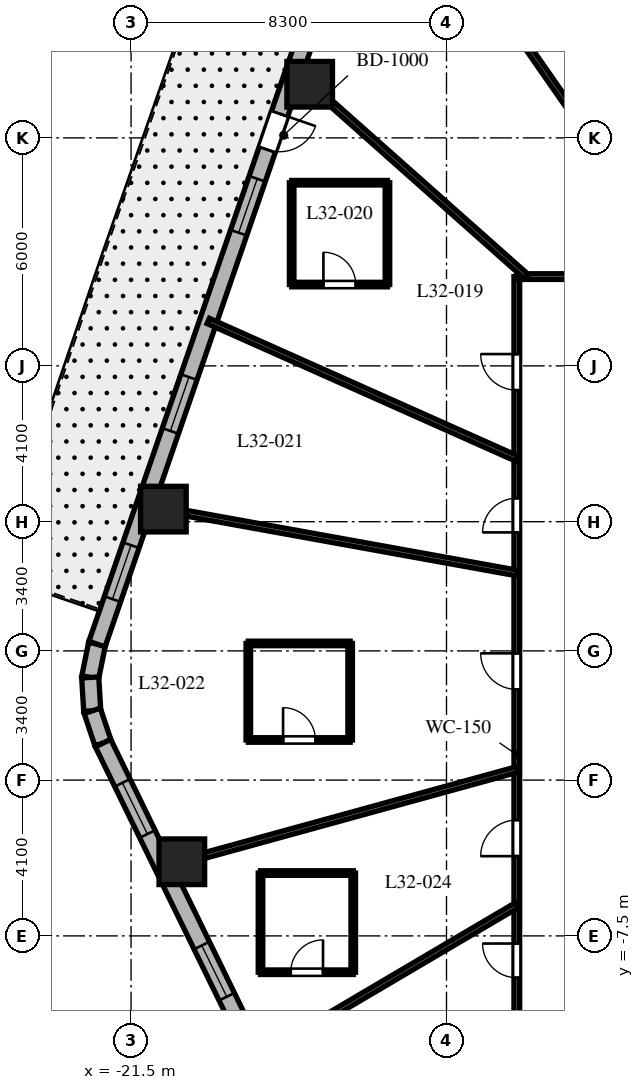
"""IFC4 building model, lengths in metres.
Left out: names, types, materials, properties, quantities, classifications, styles, units other than length and angle.
Written with IfcOpenShell. Run it as: python <this file> out.ifc"""

import sys

from ifc_helpers import new_model, si_unit, direction, frame, frame_2d, origin, origin_2d, place, context, subcontext, project, spatial, rectangle, extrude, element, fill, save


model = new_model("IFC4")
c1 = context("Model", 3, precision=1e-05, world=origin(), true_north=direction((0.0, 1.0)))
c2 = subcontext(c1, "Body", "Model", "MODEL_VIEW")
j1 = project(units=[si_unit("LENGTHUNIT", "METRE"), si_unit("PLANEANGLEUNIT", "RADIAN")], contexts=[c1])
p1 = place(None, origin())
s1 = spatial("IfcSite", under=j1, at=p1, CompositionType="ELEMENT")
p2 = place(p1, origin())
s2 = spatial("IfcBuilding", under=s1, at=p2, CompositionType="ELEMENT")
p3 = place(p2, frame((0.0, 0.0, 132.1)))
s3 = spatial("IfcBuildingStorey", under=s2, at=p3, CompositionType="ELEMENT", Elevation=132.1)
for number, where, z_axis, x_axis in (
    (1, (-16.8, 14.911, 0.0), (0.0, 0.0, 1.0), (1.0, 0.0, 0.0)),
    (2, (-20.65, 3.731, 0.0), (0.0, 0.0, 1.0), (1.0, 0.0, 0.0)),
    (3, (-20.164, -5.549, 0.0), (0.0, 0.0, 1.0), (1.0, 0.0, 0.0)),
):
    element("IfcColumn", number, at=place(p3, frame(where, z_axis=z_axis, x_axis=x_axis)), inside=s3, PredefinedType="COLUMN", context=c2, shape_type="SweptSolid", body=[
        extrude(rectangle(XDim=1.2, YDim=1.2, at=origin_2d()), origin(), (0.0, 0.0, 1.0), 3.7),
    ])
p4 = place(p3, frame((-22.397, 0.179, 0.0), z_axis=(0.0, 0.0, 1.0), x_axis=(-0.199313589404, -0.979935759669, 0.0)))
e4 = element("IfcWall", 4, at=p4, inside=s3, PredefinedType="SOLIDWALL", context=c2, shape_type="SweptSolid", body=[
    extrude(rectangle(XDim=0.896, YDim=0.45, at=frame_2d((0.448, 0.0))), origin(), (0.0, 0.0, 1.0), 3.4),
])
p5 = place(p3, frame((-22.575, -0.698, 0.0), z_axis=(0.0, 0.0, 1.0), x_axis=(0.060980441946, -0.998138961117, 0.0)))
e5 = element("IfcWall", 5, at=p5, inside=s3, PredefinedType="SOLIDWALL", context=c2, shape_type="SweptSolid", body=[
    extrude(rectangle(XDim=0.881, YDim=0.45, at=frame_2d((0.44, 0.0))), origin(), (0.0, 0.0, 1.0), 3.4),
])
p6 = place(p3, frame((-22.522, -1.577, 0.0), z_axis=(0.0, 0.0, 1.0), x_axis=(0.317372694837, -0.948300887151, 0.0)))
e6 = element("IfcWall", 6, at=p6, inside=s3, PredefinedType="SOLIDWALL", context=c2, shape_type="SweptSolid", body=[
    extrude(rectangle(XDim=0.896, YDim=0.45, at=frame_2d((0.448, 0.0))), origin(), (0.0, 0.0, 1.0), 3.4),
])
p7 = place(p3, frame((-15.992, 18.777, 0.0), z_axis=(0.0, 0.0, 1.0), x_axis=(-0.325606988926, -0.945505202927, 0.0)))
e7 = element("IfcWall", 7, at=p7, inside=s3, PredefinedType="SOLIDWALL", context=c2, shape_type="SweptSolid", body=[
    extrude(rectangle(XDim=19.669, YDim=0.45, at=frame_2d((9.835, 0.0))), origin(), (0.0, 0.0, 1.0), 3.4),
])
p8 = place(p7, frame((4.909, 0.0, 0.0)))
e8 = element("IfcOpeningElement", 8, at=p8, cuts=e7, PredefinedType="OPENING", context=c2, shape_type="SweptSolid", body=[
    extrude(rectangle(XDim=1.0, YDim=2.15, at=frame_2d((0.5, 1.075))), frame((0.0, 0.235, 0.0), z_axis=(0.0, -1.0, 0.0), x_axis=(1.0, 0.0, 0.0)), (0.0, 0.0, 1.0), 0.47),
])
p9 = place(p7, frame((1.197, 0.0, 0.8)))
e9 = element("IfcOpeningElement", 9, at=p9, cuts=e7, PredefinedType="OPENING", context=c2, shape_type="SweptSolid", body=[
    extrude(rectangle(XDim=1.5, YDim=1.8, at=frame_2d((0.75, 0.9))), frame((0.0, 0.235, 0.0), z_axis=(0.0, -1.0, 0.0), x_axis=(1.0, 0.0, 0.0)), (0.0, 0.0, 1.0), 0.47),
])
p10 = place(p7, frame((6.72, 0.0, 0.8)))
e10 = element("IfcOpeningElement", 10, at=p10, cuts=e7, PredefinedType="OPENING", context=c2, shape_type="SweptSolid", body=[
    extrude(rectangle(XDim=1.5, YDim=1.8, at=frame_2d((0.75, 0.9))), frame((0.0, 0.235, 0.0), z_axis=(0.0, -1.0, 0.0), x_axis=(1.0, 0.0, 0.0)), (0.0, 0.0, 1.0), 0.47),
])
p11 = place(p7, frame((12.238, 0.0, 0.8)))
e11 = element("IfcOpeningElement", 11, at=p11, cuts=e7, PredefinedType="OPENING", context=c2, shape_type="SweptSolid", body=[
    extrude(rectangle(XDim=1.5, YDim=1.8, at=frame_2d((0.75, 0.9))), frame((0.0, 0.235, 0.0), z_axis=(0.0, -1.0, 0.0), x_axis=(1.0, 0.0, 0.0)), (0.0, 0.0, 1.0), 0.47),
])
p12 = place(p7, frame((16.918, 0.0, 0.8)))
e12 = element("IfcOpeningElement", 12, at=p12, cuts=e7, PredefinedType="OPENING", context=c2, shape_type="SweptSolid", body=[
    extrude(rectangle(XDim=1.5, YDim=1.8, at=frame_2d((0.75, 0.9))), frame((0.0, 0.235, 0.0), z_axis=(0.0, -1.0, 0.0), x_axis=(1.0, 0.0, 0.0)), (0.0, 0.0, 1.0), 0.47),
])
p13 = place(p3, frame((-22.238, -2.427, 0.0), z_axis=(0.0, 0.0, 1.0), x_axis=(0.438374803278, -0.898792262901, 0.0)))
e13 = element("IfcWall", 13, at=p13, inside=s3, PredefinedType="SOLIDWALL", context=c2, shape_type="SweptSolid", body=[
    extrude(rectangle(XDim=18.618, YDim=0.45, at=frame_2d((9.309, 0.0))), origin(), (0.0, 0.0, 1.0), 3.4),
])
p14 = place(p13, frame((1.163, 0.0, 0.8)))
e14 = element("IfcOpeningElement", 14, at=p14, cuts=e13, PredefinedType="OPENING", context=c2, shape_type="SweptSolid", body=[
    extrude(rectangle(XDim=1.5, YDim=1.8, at=frame_2d((0.75, 0.9))), frame((0.0, 0.235, 0.0), z_axis=(0.0, -1.0, 0.0), x_axis=(1.0, 0.0, 0.0)), (0.0, 0.0, 1.0), 0.47),
])
p15 = place(p13, frame((5.926, 0.0, 0.8)))
e15 = element("IfcOpeningElement", 15, at=p15, cuts=e13, PredefinedType="OPENING", context=c2, shape_type="SweptSolid", body=[
    extrude(rectangle(XDim=1.5, YDim=1.8, at=frame_2d((0.75, 0.9))), frame((0.0, 0.235, 0.0), z_axis=(0.0, -1.0, 0.0), x_axis=(1.0, 0.0, 0.0)), (0.0, 0.0, 1.0), 0.47),
])
p16 = place(p13, frame((11.165, 0.0, 0.8)))
e16 = element("IfcOpeningElement", 16, at=p16, cuts=e13, PredefinedType="OPENING", context=c2, shape_type="SweptSolid", body=[
    extrude(rectangle(XDim=1.5, YDim=1.8, at=frame_2d((0.75, 0.9))), frame((0.0, 0.235, 0.0), z_axis=(0.0, -1.0, 0.0), x_axis=(1.0, 0.0, 0.0)), (0.0, 0.0, 1.0), 0.47),
])
p17 = place(p13, frame((16.006, 0.0, 0.8)))
e17 = element("IfcOpeningElement", 17, at=p17, cuts=e13, PredefinedType="OPENING", context=c2, shape_type="SweptSolid", body=[
    extrude(rectangle(XDim=1.5, YDim=1.8, at=frame_2d((0.75, 0.9))), frame((0.0, 0.235, 0.0), z_axis=(0.0, -1.0, 0.0), x_axis=(1.0, 0.0, 0.0)), (0.0, 0.0, 1.0), 0.47),
])
p18 = place(p3, frame((-11.35, -9.85, 0.0), z_axis=(0.0, 0.0, 1.0), x_axis=(0.0, 1.0, 0.0)))
e18 = element("IfcWall", 18, at=p18, inside=s3, PredefinedType="PARTITIONING", context=c2, shape_type="SweptSolid", body=[
    extrude(rectangle(XDim=19.7, YDim=0.15, at=frame_2d((9.85, 0.0))), origin(), (0.0, 0.0, 1.0), 2.84),
])
p19 = place(p18, frame((16.711, 0.0, 0.0)))
e19 = element("IfcOpeningElement", 19, at=p19, cuts=e18, PredefinedType="OPENING", context=c2, shape_type="SweptSolid", body=[
    extrude(rectangle(XDim=0.95, YDim=2.03, at=frame_2d((0.475, 1.015))), frame((0.0, 0.085, 0.0), z_axis=(0.0, -1.0, 0.0), x_axis=(1.0, 0.0, 0.0)), (0.0, 0.0, 1.0), 0.17),
])
p20 = place(p18, frame((12.968, 0.0, 0.0)))
e20 = element("IfcOpeningElement", 20, at=p20, cuts=e18, PredefinedType="OPENING", context=c2, shape_type="SweptSolid", body=[
    extrude(rectangle(XDim=0.9, YDim=2.03, at=frame_2d((0.45, 1.015))), frame((0.0, 0.085, 0.0), z_axis=(0.0, -1.0, 0.0), x_axis=(1.0, 0.0, 0.0)), (0.0, 0.0, 1.0), 0.17),
])
p21 = place(p18, frame((8.836, 0.0, 0.0)))
e21 = element("IfcOpeningElement", 21, at=p21, cuts=e18, PredefinedType="OPENING", context=c2, shape_type="SweptSolid", body=[
    extrude(rectangle(XDim=0.95, YDim=2.03, at=frame_2d((0.475, 1.015))), frame((0.0, 0.085, 0.0), z_axis=(0.0, -1.0, 0.0), x_axis=(1.0, 0.0, 0.0)), (0.0, 0.0, 1.0), 0.17),
])
p22 = place(p18, frame((4.448, 0.0, 0.0)))
e22 = element("IfcOpeningElement", 22, at=p22, cuts=e18, PredefinedType="OPENING", context=c2, shape_type="SweptSolid", body=[
    extrude(rectangle(XDim=0.95, YDim=2.03, at=frame_2d((0.475, 1.015))), frame((0.0, 0.085, 0.0), z_axis=(0.0, -1.0, 0.0), x_axis=(1.0, 0.0, 0.0)), (0.0, 0.0, 1.0), 0.17),
])
p23 = place(p18, frame((1.249, 0.0, 0.0)))
e23 = element("IfcOpeningElement", 23, at=p23, cuts=e18, PredefinedType="OPENING", context=c2, shape_type="SweptSolid", body=[
    extrude(rectangle(XDim=0.9, YDim=2.03, at=frame_2d((0.45, 1.015))), frame((0.0, 0.085, 0.0), z_axis=(0.0, -1.0, 0.0), x_axis=(1.0, 0.0, 0.0)), (0.0, 0.0, 1.0), 0.17),
])
p24 = place(p3, frame((-11.35, 9.85, 0.0), z_axis=(0.0, 0.0, 1.0), x_axis=(1.0, 0.0, 0.0)))
e24 = element("IfcWall", 24, at=p24, inside=s3, PredefinedType="PARTITIONING", context=c2, shape_type="SweptSolid", body=[
    extrude(rectangle(XDim=22.7, YDim=0.15, at=frame_2d((11.35, 0.0))), origin(), (0.0, 0.0, 1.0), 2.84),
])
p25 = place(p24, frame((17.237, 0.0, 0.0)))
e25 = element("IfcOpeningElement", 25, at=p25, cuts=e24, PredefinedType="OPENING", context=c2, shape_type="SweptSolid", body=[
    extrude(rectangle(XDim=0.95, YDim=2.03, at=frame_2d((0.475, 1.015))), frame((0.0, 0.085, 0.0), z_axis=(0.0, -1.0, 0.0), x_axis=(1.0, 0.0, 0.0)), (0.0, 0.0, 1.0), 0.17),
])
p26 = place(p24, frame((10.45, 0.0, 0.0)))
e26 = element("IfcOpeningElement", 26, at=p26, cuts=e24, PredefinedType="OPENING", context=c2, shape_type="SweptSolid", body=[
    extrude(rectangle(XDim=0.95, YDim=2.03, at=frame_2d((0.475, 1.015))), frame((0.0, 0.085, 0.0), z_axis=(0.0, -1.0, 0.0), x_axis=(1.0, 0.0, 0.0)), (0.0, 0.0, 1.0), 0.17),
])
p27 = place(p24, frame((5.522, 0.0, 0.0)))
e27 = element("IfcOpeningElement", 27, at=p27, cuts=e24, PredefinedType="OPENING", context=c2, shape_type="SweptSolid", body=[
    extrude(rectangle(XDim=0.9, YDim=2.03, at=frame_2d((0.45, 1.015))), frame((0.0, 0.085, 0.0), z_axis=(0.0, -1.0, 0.0), x_axis=(1.0, 0.0, 0.0)), (0.0, 0.0, 1.0), 0.17),
])
p28 = place(p24, frame((1.914, 0.0, 0.0)))
e28 = element("IfcOpeningElement", 28, at=p28, cuts=e24, PredefinedType="OPENING", context=c2, shape_type="SweptSolid", body=[
    extrude(rectangle(XDim=0.9, YDim=2.03, at=frame_2d((0.45, 1.015))), frame((0.0, 0.085, 0.0), z_axis=(0.0, -1.0, 0.0), x_axis=(1.0, 0.0, 0.0)), (0.0, 0.0, 1.0), 0.17),
])
p29 = place(p3, frame((-6.861, 9.85, 0.0), z_axis=(0.0, 0.0, 1.0), x_axis=(-0.571575431292, 0.820549527051, 0.0)))
e29 = element("IfcWall", 29, at=p29, inside=s3, PredefinedType="PARTITIONING", context=c2, shape_type="SweptSolid", body=[
    extrude(rectangle(XDim=12.975, YDim=0.15, at=frame_2d((6.488, 0.0))), origin(), (0.0, 0.0, 1.0), 2.54),
])
p30 = place(p3, frame((-11.098, 9.85, 0.0), z_axis=(0.0, 0.0, 1.0), x_axis=(-0.747904295103, 0.663806572253, 0.0)))
e30 = element("IfcWall", 30, at=p30, inside=s3, PredefinedType="PARTITIONING", context=c2, shape_type="SweptSolid", body=[
    extrude(rectangle(XDim=8.16, YDim=0.15, at=frame_2d((4.08, 0.0))), origin(), (0.0, 0.0, 1.0), 2.54),
])
p31 = place(p3, frame((-11.35, 5.062, 0.0), z_axis=(0.0, 0.0, 1.0), x_axis=(-0.91329663997, 0.407295037312, 0.0)))
e31 = element("IfcWall", 31, at=p31, inside=s3, PredefinedType="PARTITIONING", context=c2, shape_type="SweptSolid", body=[
    extrude(rectangle(XDim=8.889, YDim=0.15, at=frame_2d((4.445, 0.0))), origin(), (0.0, 0.0, 1.0), 2.54),
])
p32 = place(p3, frame((-11.35, 2.051, 0.0), z_axis=(0.0, 0.0, 1.0), x_axis=(-0.984068313063, 0.177790762484, 0.0)))
e32 = element("IfcWall", 32, at=p32, inside=s3, PredefinedType="PARTITIONING", context=c2, shape_type="SweptSolid", body=[
    extrude(rectangle(XDim=9.951, YDim=0.15, at=frame_2d((4.976, 0.0))), origin(), (0.0, 0.0, 1.0), 2.54),
])
p33 = place(p3, frame((-11.35, -3.123, 0.0), z_axis=(0.0, 0.0, 1.0), x_axis=(-0.964151983214, -0.265350623261, 0.0)))
e33 = element("IfcWall", 33, at=p33, inside=s3, PredefinedType="PARTITIONING", context=c2, shape_type="SweptSolid", body=[
    extrude(rectangle(XDim=9.645, YDim=0.15, at=frame_2d((4.823, 0.0))), origin(), (0.0, 0.0, 1.0), 2.54),
])
p34 = place(p3, frame((-11.35, -6.691, 0.0), z_axis=(0.0, 0.0, 1.0), x_axis=(-0.861446954497, -0.507847560383, 0.0)))
e34 = element("IfcWall", 34, at=p34, inside=s3, PredefinedType="PARTITIONING", context=c2, shape_type="SweptSolid", body=[
    extrude(rectangle(XDim=7.941, YDim=0.15, at=frame_2d((3.97, 0.0))), origin(), (0.0, 0.0, 1.0), 2.54),
])
p35 = place(p3, frame((-17.274, 9.64, 0.0), z_axis=(0.0, 0.0, 1.0), x_axis=(1.0, 0.0, 0.0)))
e35 = element("IfcWall", 35, at=p35, inside=s3, PredefinedType="PARTITIONING", context=c2, shape_type="SweptSolid", body=[
    extrude(rectangle(XDim=2.52, YDim=0.12, at=frame_2d((1.26, 0.0))), origin(), (0.0, 0.0, 1.0), 2.972),
])
p36 = place(p35, frame((0.835, 0.0, 0.0)))
e36 = element("IfcOpeningElement", 36, at=p36, cuts=e35, PredefinedType="OPENING", context=c2, shape_type="SweptSolid", body=[
    extrude(rectangle(XDim=0.85, YDim=2.03, at=frame_2d((0.425, 1.015))), frame((0.0, 0.07, 0.0), z_axis=(0.0, -1.0, 0.0), x_axis=(1.0, 0.0, 0.0)), (0.0, 0.0, 1.0), 0.14),
])
p37 = place(p3, frame((-14.754, 9.64, 0.0), z_axis=(0.0, 0.0, 1.0), x_axis=(0.0, 1.0, 0.0)))
e37 = element("IfcWall", 37, at=p37, inside=s3, PredefinedType="PARTITIONING", context=c2, shape_type="SweptSolid", body=[
    extrude(rectangle(XDim=2.68, YDim=0.12, at=frame_2d((1.34, 0.0))), origin(), (0.0, 0.0, 1.0), 2.972),
])
p38 = place(p3, frame((-14.754, 12.32, 0.0), z_axis=(0.0, 0.0, 1.0), x_axis=(-1.0, 0.0, 0.0)))
e38 = element("IfcWall", 38, at=p38, inside=s3, PredefinedType="PARTITIONING", context=c2, shape_type="SweptSolid", body=[
    extrude(rectangle(XDim=2.52, YDim=0.12, at=frame_2d((1.26, 0.0))), origin(), (0.0, 0.0, 1.0), 3.4),
])
p39 = place(p3, frame((-17.274, 12.32, 0.0), z_axis=(0.0, 0.0, 1.0), x_axis=(0.0, -1.0, 0.0)))
e39 = element("IfcWall", 39, at=p39, inside=s3, PredefinedType="PARTITIONING", context=c2, shape_type="SweptSolid", body=[
    extrude(rectangle(XDim=2.68, YDim=0.12, at=frame_2d((1.34, 0.0))), origin(), (0.0, 0.0, 1.0), 3.4),
])
p40 = place(p3, frame((-18.415, -2.344, 0.0), z_axis=(0.0, 0.0, 1.0), x_axis=(1.0, 0.0, 0.0)))
e40 = element("IfcWall", 40, at=p40, inside=s3, PredefinedType="PARTITIONING", context=c2, shape_type="SweptSolid", body=[
    extrude(rectangle(XDim=2.68, YDim=0.12, at=frame_2d((1.34, 0.0))), origin(), (0.0, 0.0, 1.0), 2.84),
])
p41 = place(p40, frame((0.915, 0.0, 0.0)))
e41 = element("IfcOpeningElement", 41, at=p41, cuts=e40, PredefinedType="OPENING", context=c2, shape_type="SweptSolid", body=[
    extrude(rectangle(XDim=0.85, YDim=2.03, at=frame_2d((0.425, 1.015))), frame((0.0, 0.07, 0.0), z_axis=(0.0, -1.0, 0.0), x_axis=(1.0, 0.0, 0.0)), (0.0, 0.0, 1.0), 0.14),
])
p42 = place(p3, frame((-15.735, -2.344, 0.0), z_axis=(0.0, 0.0, 1.0), x_axis=(0.0, 1.0, 0.0)))
e42 = element("IfcWall", 42, at=p42, inside=s3, PredefinedType="PARTITIONING", context=c2, shape_type="SweptSolid", body=[
    extrude(rectangle(XDim=2.54, YDim=0.12, at=frame_2d((1.27, 0.0))), origin(), (0.0, 0.0, 1.0), 3.4),
])
p43 = place(p3, frame((-15.735, 0.196, 0.0), z_axis=(0.0, 0.0, 1.0), x_axis=(-1.0, 0.0, 0.0)))
e43 = element("IfcWall", 43, at=p43, inside=s3, PredefinedType="PARTITIONING", context=c2, shape_type="SweptSolid", body=[
    extrude(rectangle(XDim=2.68, YDim=0.12, at=frame_2d((1.34, 0.0))), origin(), (0.0, 0.0, 1.0), 2.84),
])
p44 = place(p3, frame((-18.415, 0.196, 0.0), z_axis=(0.0, 0.0, 1.0), x_axis=(0.0, -1.0, 0.0)))
e44 = element("IfcWall", 44, at=p44, inside=s3, PredefinedType="PARTITIONING", context=c2, shape_type="SweptSolid", body=[
    extrude(rectangle(XDim=2.54, YDim=0.12, at=frame_2d((1.27, 0.0))), origin(), (0.0, 0.0, 1.0), 3.4),
])
p45 = place(p3, frame((-18.094, -8.456, 0.0), z_axis=(0.0, 0.0, 1.0), x_axis=(1.0, 0.0, 0.0)))
e45 = element("IfcWall", 45, at=p45, inside=s3, PredefinedType="PARTITIONING", context=c2, shape_type="SweptSolid", body=[
    extrude(rectangle(XDim=2.44, YDim=0.12, at=frame_2d((1.22, 0.0))), origin(), (0.0, 0.0, 1.0), 3.4),
])
p46 = place(p45, frame((0.795, 0.0, 0.0)))
e46 = element("IfcOpeningElement", 46, at=p46, cuts=e45, PredefinedType="OPENING", context=c2, shape_type="SweptSolid", body=[
    extrude(rectangle(XDim=0.85, YDim=2.03, at=frame_2d((0.425, 1.015))), frame((0.0, 0.07, 0.0), z_axis=(0.0, -1.0, 0.0), x_axis=(1.0, 0.0, 0.0)), (0.0, 0.0, 1.0), 0.14),
])
p47 = place(p3, frame((-15.654, -8.456, 0.0), z_axis=(0.0, 0.0, 1.0), x_axis=(0.0, 1.0, 0.0)))
e47 = element("IfcWall", 47, at=p47, inside=s3, PredefinedType="PARTITIONING", context=c2, shape_type="SweptSolid", body=[
    extrude(rectangle(XDim=2.61, YDim=0.12, at=frame_2d((1.305, 0.0))), origin(), (0.0, 0.0, 1.0), 2.84),
])
p48 = place(p3, frame((-15.654, -5.846, 0.0), z_axis=(0.0, 0.0, 1.0), x_axis=(-1.0, 0.0, 0.0)))
e48 = element("IfcWall", 48, at=p48, inside=s3, PredefinedType="PARTITIONING", context=c2, shape_type="SweptSolid", body=[
    extrude(rectangle(XDim=2.44, YDim=0.12, at=frame_2d((1.22, 0.0))), origin(), (0.0, 0.0, 1.0), 2.84),
])
p49 = place(p3, frame((-18.094, -5.846, 0.0), z_axis=(0.0, 0.0, 1.0), x_axis=(0.0, -1.0, 0.0)))
e49 = element("IfcWall", 49, at=p49, inside=s3, PredefinedType="PARTITIONING", context=c2, shape_type="SweptSolid", body=[
    extrude(rectangle(XDim=2.61, YDim=0.12, at=frame_2d((1.305, 0.0))), origin(), (0.0, 0.0, 1.0), 2.84),
])
p50 = place(p8, origin())
e50 = element("IfcDoor", 50, at=p50, inside=s3, OperationType="SINGLE_SWING_LEFT", PredefinedType="DOOR", context=c2, shape_type="SweptSolid", body=[
    extrude(rectangle(XDim=1.0, YDim=2.15, at=frame_2d((0.5, 1.075))), frame((0.0, 0.025, 0.0), z_axis=(0.0, -1.0, 0.0), x_axis=(1.0, 0.0, 0.0)), (0.0, 0.0, 1.0), 0.05),
])
fill(e8, e50)
p51 = place(p10, origin())
e51 = element("IfcWindow", 51, at=p51, inside=s3, PartitioningType="SINGLE_PANEL", PredefinedType="WINDOW", context=c2, shape_type="SweptSolid", body=[
    extrude(rectangle(XDim=1.5, YDim=1.8, at=frame_2d((0.75, 0.9))), frame((0.0, 0.03, 0.0), z_axis=(0.0, -1.0, 0.0), x_axis=(1.0, 0.0, 0.0)), (0.0, 0.0, 1.0), 0.06),
])
fill(e10, e51)
p52 = place(p11, origin())
e52 = element("IfcWindow", 52, at=p52, inside=s3, PartitioningType="SINGLE_PANEL", PredefinedType="WINDOW", context=c2, shape_type="SweptSolid", body=[
    extrude(rectangle(XDim=1.5, YDim=1.8, at=frame_2d((0.75, 0.9))), frame((0.0, 0.03, 0.0), z_axis=(0.0, -1.0, 0.0), x_axis=(1.0, 0.0, 0.0)), (0.0, 0.0, 1.0), 0.06),
])
fill(e11, e52)
p53 = place(p12, origin())
e53 = element("IfcWindow", 53, at=p53, inside=s3, PartitioningType="SINGLE_PANEL", PredefinedType="WINDOW", context=c2, shape_type="SweptSolid", body=[
    extrude(rectangle(XDim=1.5, YDim=1.8, at=frame_2d((0.75, 0.9))), frame((0.0, 0.03, 0.0), z_axis=(0.0, -1.0, 0.0), x_axis=(1.0, 0.0, 0.0)), (0.0, 0.0, 1.0), 0.06),
])
fill(e12, e53)
p54 = place(p14, origin())
e54 = element("IfcWindow", 54, at=p54, inside=s3, PartitioningType="SINGLE_PANEL", PredefinedType="WINDOW", context=c2, shape_type="SweptSolid", body=[
    extrude(rectangle(XDim=1.5, YDim=1.8, at=frame_2d((0.75, 0.9))), frame((0.0, 0.03, 0.0), z_axis=(0.0, -1.0, 0.0), x_axis=(1.0, 0.0, 0.0)), (0.0, 0.0, 1.0), 0.06),
])
fill(e14, e54)
p55 = place(p15, origin())
e55 = element("IfcWindow", 55, at=p55, inside=s3, PartitioningType="SINGLE_PANEL", PredefinedType="WINDOW", context=c2, shape_type="SweptSolid", body=[
    extrude(rectangle(XDim=1.5, YDim=1.8, at=frame_2d((0.75, 0.9))), frame((0.0, 0.03, 0.0), z_axis=(0.0, -1.0, 0.0), x_axis=(1.0, 0.0, 0.0)), (0.0, 0.0, 1.0), 0.06),
])
fill(e15, e55)
p56 = place(p19, origin())
e56 = element("IfcDoor", 56, at=p56, inside=s3, OperationType="SINGLE_SWING_RIGHT", PredefinedType="DOOR", context=c2, shape_type="SweptSolid", body=[
    extrude(rectangle(XDim=0.95, YDim=2.03, at=frame_2d((0.475, 1.015))), frame((0.0, 0.025, 0.0), z_axis=(0.0, -1.0, 0.0), x_axis=(1.0, 0.0, 0.0)), (0.0, 0.0, 1.0), 0.05),
])
fill(e19, e56)
p57 = place(p36, origin())
e57 = element("IfcDoor", 57, at=p57, inside=s3, OperationType="SINGLE_SWING_LEFT", PredefinedType="DOOR", context=c2, shape_type="SweptSolid", body=[
    extrude(rectangle(XDim=0.85, YDim=2.03, at=frame_2d((0.425, 1.015))), frame((0.0, 0.025, 0.0), z_axis=(0.0, -1.0, 0.0), x_axis=(1.0, 0.0, 0.0)), (0.0, 0.0, 1.0), 0.05),
])
fill(e36, e57)
p58 = place(p20, origin())
e58 = element("IfcDoor", 58, at=p58, inside=s3, OperationType="SINGLE_SWING_LEFT", PredefinedType="DOOR", context=c2, shape_type="SweptSolid", body=[
    extrude(rectangle(XDim=0.9, YDim=2.03, at=frame_2d((0.45, 1.015))), frame((0.0, 0.025, 0.0), z_axis=(0.0, -1.0, 0.0), x_axis=(1.0, 0.0, 0.0)), (0.0, 0.0, 1.0), 0.05),
])
fill(e20, e58)
p59 = place(p21, origin())
e59 = element("IfcDoor", 59, at=p59, inside=s3, OperationType="SINGLE_SWING_RIGHT", PredefinedType="DOOR", context=c2, shape_type="SweptSolid", body=[
    extrude(rectangle(XDim=0.95, YDim=2.03, at=frame_2d((0.475, 1.015))), frame((0.0, 0.025, 0.0), z_axis=(0.0, -1.0, 0.0), x_axis=(1.0, 0.0, 0.0)), (0.0, 0.0, 1.0), 0.05),
])
fill(e21, e59)
p60 = place(p41, origin())
e60 = element("IfcDoor", 60, at=p60, inside=s3, OperationType="SINGLE_SWING_LEFT", PredefinedType="DOOR", context=c2, shape_type="SweptSolid", body=[
    extrude(rectangle(XDim=0.85, YDim=2.03, at=frame_2d((0.425, 1.015))), frame((0.0, 0.025, 0.0), z_axis=(0.0, -1.0, 0.0), x_axis=(1.0, 0.0, 0.0)), (0.0, 0.0, 1.0), 0.05),
])
fill(e41, e60)
p61 = place(p22, origin())
e61 = element("IfcDoor", 61, at=p61, inside=s3, OperationType="SINGLE_SWING_LEFT", PredefinedType="DOOR", context=c2, shape_type="SweptSolid", body=[
    extrude(rectangle(XDim=0.95, YDim=2.03, at=frame_2d((0.475, 1.015))), frame((0.0, 0.025, 0.0), z_axis=(0.0, -1.0, 0.0), x_axis=(1.0, 0.0, 0.0)), (0.0, 0.0, 1.0), 0.05),
])
fill(e22, e61)
p62 = place(p46, origin())
e62 = element("IfcDoor", 62, at=p62, inside=s3, OperationType="SINGLE_SWING_RIGHT", PredefinedType="DOOR", context=c2, shape_type="SweptSolid", body=[
    extrude(rectangle(XDim=0.85, YDim=2.03, at=frame_2d((0.425, 1.015))), frame((0.0, 0.025, 0.0), z_axis=(0.0, -1.0, 0.0), x_axis=(1.0, 0.0, 0.0)), (0.0, 0.0, 1.0), 0.05),
])
fill(e46, e62)
p63 = place(p23, origin())
e63 = element("IfcDoor", 63, at=p63, inside=s3, OperationType="SINGLE_SWING_RIGHT", PredefinedType="DOOR", context=c2, shape_type="SweptSolid", body=[
    extrude(rectangle(XDim=0.9, YDim=2.03, at=frame_2d((0.45, 1.015))), frame((0.0, 0.025, 0.0), z_axis=(0.0, -1.0, 0.0), x_axis=(1.0, 0.0, 0.0)), (0.0, 0.0, 1.0), 0.05),
])
fill(e23, e63)
save(model, sys.argv[1])
